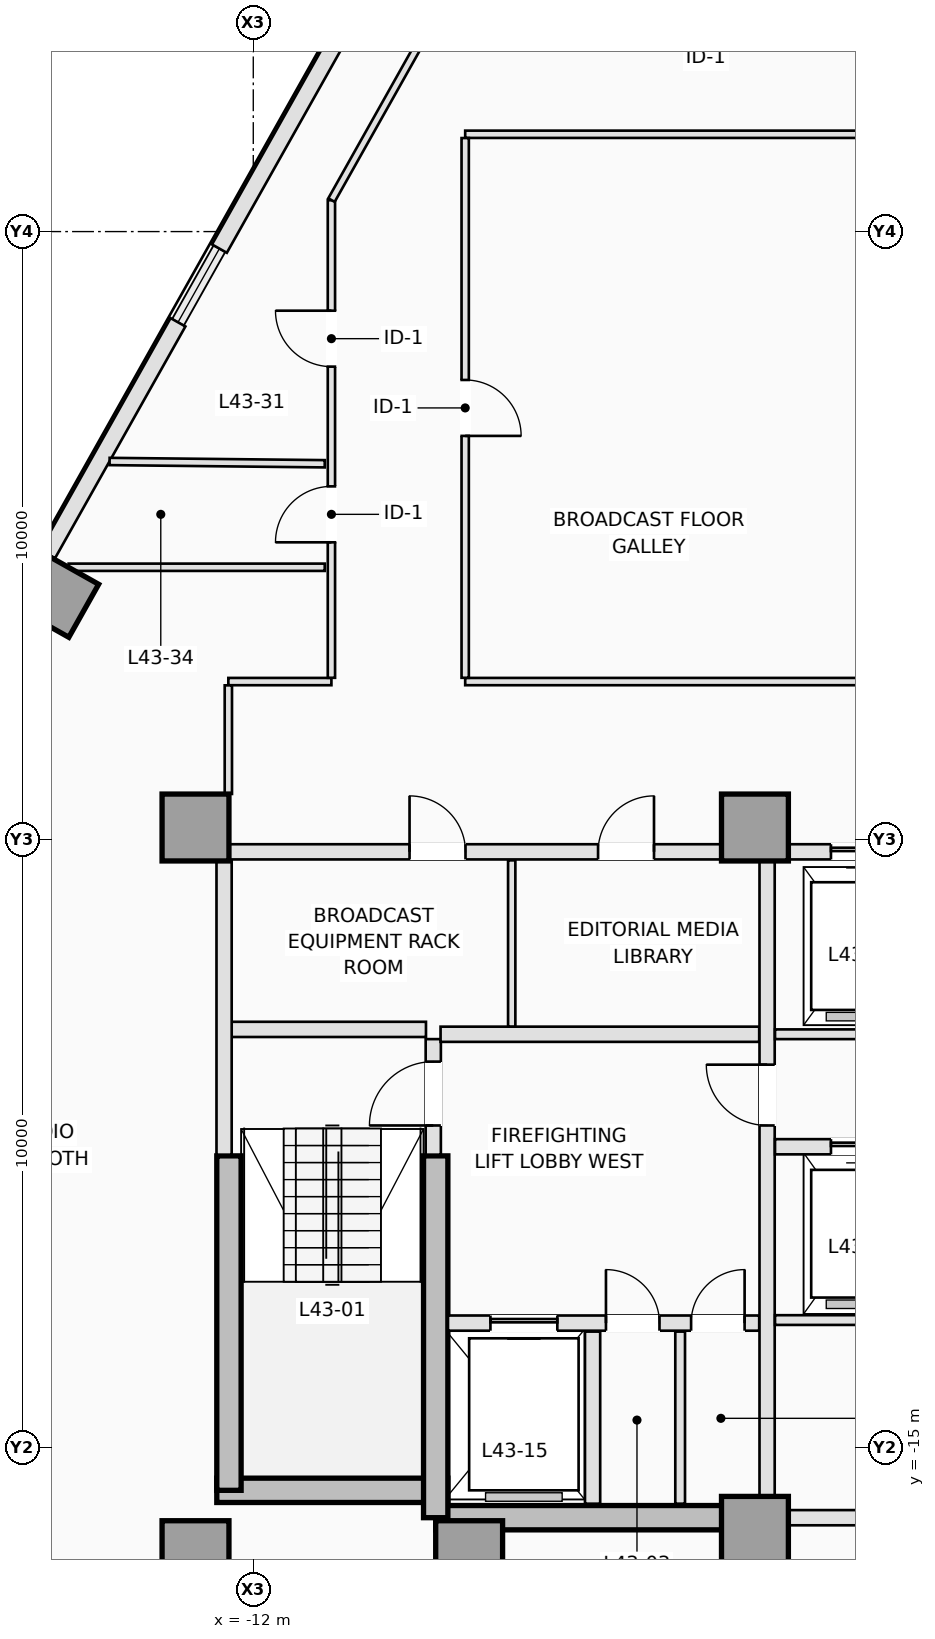
"""IFC4 building model, lengths in metres.
Left out: names, types, materials, properties, quantities, classifications, styles, units other than length and angle.
Written with IfcOpenShell. Run it as: python <this file> out.ifc"""

import sys

from ifc_helpers import new_model, si_unit, direction, frame, frame_2d, origin, origin_2d, place, context, subcontext, project, spatial, rectangle, extrude, element, fill, save


model = new_model("IFC4")
c1 = context("Model", 3, precision=1e-05, world=origin(), true_north=direction((0.0, 1.0)))
c2 = subcontext(c1, "Body", "Model", "MODEL_VIEW")
j1 = project(units=[si_unit("LENGTHUNIT", "METRE"), si_unit("PLANEANGLEUNIT", "RADIAN")], contexts=[c1])
p1 = place(None, origin())
s1 = spatial("IfcSite", under=j1, at=p1, CompositionType="ELEMENT")
p2 = place(p1, origin())
s2 = spatial("IfcBuilding", under=s1, at=p2, CompositionType="ELEMENT")
p3 = place(p2, frame((0.0, 0.0, 158.0)))
s3 = spatial("IfcBuildingStorey", under=s2, at=p3, CompositionType="ELEMENT", Elevation=158.0)
p4 = place(p3, frame((-12.6, -15.7, 0.0), z_axis=(0.0, 0.0, 1.0), x_axis=(1.0, 0.0, 0.0)))
e1 = element("IfcWall", 1, at=p4, inside=s3, PredefinedType="SHEAR", context=c2, shape_type="SweptSolid", body=[
    extrude(rectangle(XDim=3.8, YDim=0.4, at=frame_2d((1.9, 0.0))), origin(), (0.0, 0.0, 1.0), 3.5),
])
p5 = place(p3, frame((-9.0, -16.15, 0.0), z_axis=(0.0, 0.0, 1.0), x_axis=(1.0, 0.0, 0.0)))
e2 = element("IfcWall", 2, at=p5, inside=s3, PredefinedType="SHEAR", context=c2, shape_type="SweptSolid", body=[
    extrude(rectangle(XDim=5.25, YDim=0.4, at=frame_2d((2.625, 0.0))), origin(), (0.0, 0.0, 1.0), 3.5),
])
p6 = place(p3, frame((-12.4, -15.7, 0.0), z_axis=(0.0, 0.0, 1.0), x_axis=(0.0, 1.0, 0.0)))
e3 = element("IfcWall", 3, at=p6, inside=s3, PredefinedType="SHEAR", context=c2, shape_type="SweptSolid", body=[
    extrude(rectangle(XDim=5.5, YDim=0.4, at=frame_2d((2.75, 0.0))), origin(), (0.0, 0.0, 1.0), 3.5),
])
p7 = place(p3, frame((-9.0, -16.15, 0.0), z_axis=(0.0, 0.0, 1.0), x_axis=(0.0, 1.0, 0.0)))
e4 = element("IfcWall", 4, at=p7, inside=s3, PredefinedType="SHEAR", context=c2, shape_type="SweptSolid", body=[
    extrude(rectangle(XDim=5.95, YDim=0.4, at=frame_2d((2.975, 0.0))), origin(), (0.0, 0.0, 1.0), 3.5),
])
for number, where, z_axis, x_axis in (
    (5, (-12.95, -16.75, 0.0), (0.0, 0.0, 1.0), (1.0, 0.0, 0.0)),
    (6, (-8.45, -16.75, 0.0), (0.0, 0.0, 1.0), (1.0, 0.0, 0.0)),
    (7, (-3.75, -16.35, 0.0), (0.0, 0.0, 1.0), (1.0, 0.0, 0.0)),
    (8, (-12.95, -4.8, 0.0), (0.0, 0.0, 1.0), (1.0, 0.0, 0.0)),
    (9, (-3.75, -4.8, 0.0), (0.0, 0.0, 1.0), (1.0, 0.0, 0.0)),
):
    element("IfcColumn", number, at=place(p3, frame(where, z_axis=z_axis, x_axis=x_axis)), inside=s3, PredefinedType="COLUMN", context=c2, shape_type="SweptSolid", body=[
        extrude(rectangle(XDim=1.1, YDim=1.1, at=origin_2d()), origin(), (0.0, 0.0, 1.0), 3.5),
    ])
p8 = place(p3, frame((-15.224, -0.991, 0.0), z_axis=(0.0, 0.0, 1.0), x_axis=(-0.871575139605, 0.490261946333, 0.0)))
e10 = element("IfcColumn", 10, at=p8, inside=s3, PredefinedType="COLUMN", context=c2, shape_type="SweptSolid", body=[
    extrude(rectangle(XDim=1.0, YDim=1.0, at=origin_2d()), origin(), (0.0, 0.0, 1.0), 3.5),
])
p9 = place(p3, frame((-15.383, -0.305, 0.0), z_axis=(0.0, 0.0, 1.0), x_axis=(0.490232095789, 0.871591929895, 0.0)))
e11 = element("IfcWall", 11, at=p9, inside=s3, PredefinedType="STANDARD", context=c2, shape_type="SweptSolid", body=[
    extrude(rectangle(XDim=4.375, YDim=0.28, at=frame_2d((2.188, 0.0))), origin(), (0.0, 0.0, 1.0), 3.25),
])
p10 = place(p3, frame((-12.557, 4.72, 0.0), z_axis=(0.0, 0.0, 1.0), x_axis=(0.490274486291, 0.871568085747, 0.0)))
e12 = element("IfcWall", 12, at=p10, inside=s3, PredefinedType="STANDARD", context=c2, shape_type="SweptSolid", body=[
    extrude(rectangle(XDim=4.375, YDim=0.28, at=frame_2d((2.188, 0.0))), origin(), (0.0, 0.0, 1.0), 3.25),
])
p11 = place(p3, frame((-9.04, -10.18, 0.0), z_axis=(0.0, 0.0, 1.0), x_axis=(0.0, 1.0, 0.0)))
e13 = element("IfcWall", 13, at=p11, inside=s3, PredefinedType="PARTITIONING", context=c2, shape_type="SweptSolid", body=[
    extrude(rectangle(XDim=1.9, YDim=0.25, at=frame_2d((0.95, 0.0))), origin(), (0.0, 0.0, 1.0), 3.25),
])
p12 = place(p11, frame((0.48, 0.0, 0.0)))
e14 = element("IfcOpeningElement", 14, at=p12, cuts=e13, PredefinedType="OPENING", context=c2, shape_type="SweptSolid", body=[
    extrude(rectangle(XDim=1.05, YDim=2.15, at=frame_2d((0.525, 1.075))), frame((0.0, 0.135, 0.0), z_axis=(0.0, -1.0, 0.0), x_axis=(1.0, 0.0, 0.0)), (0.0, 0.0, 1.0), 0.27),
])
p13 = place(p3, frame((-12.38, -8.12, 0.0), z_axis=(0.0, 0.0, 1.0), x_axis=(1.0, 0.0, 0.0)))
e15 = element("IfcWall", 15, at=p13, inside=s3, PredefinedType="PARTITIONING", context=c2, shape_type="SweptSolid", body=[
    extrude(rectangle(XDim=3.22, YDim=0.25, at=frame_2d((1.61, 0.0))), origin(), (0.0, 0.0, 1.0), 3.25),
])
p14 = place(p3, frame((-12.48, -10.18, 0.0), z_axis=(0.0, 0.0, 1.0), x_axis=(0.0, 1.0, 0.0)))
e16 = element("IfcWall", 16, at=p14, inside=s3, PredefinedType="PARTITIONING", context=c2, shape_type="SweptSolid", body=[
    extrude(rectangle(XDim=4.828, YDim=0.25, at=frame_2d((2.414, 0.0))), origin(), (0.0, 0.0, 1.0), 3.25),
])
p15 = place(p3, frame((-8.798, -12.95, 0.0), z_axis=(0.0, 0.0, 1.0), x_axis=(1.0, 0.0, 0.0)))
e17 = element("IfcWall", 17, at=p15, inside=s3, PredefinedType="PARTITIONING", context=c2, shape_type="SweptSolid", body=[
    extrude(rectangle(XDim=5.118, YDim=0.25, at=frame_2d((2.559, 0.0))), origin(), (0.0, 0.0, 1.0), 3.25),
])
p16 = place(p15, frame((0.698, 0.0, 0.0)))
e18 = element("IfcOpeningElement", 18, at=p16, cuts=e17, PredefinedType="OPENING", context=c2, shape_type="SweptSolid", body=[
    extrude(rectangle(XDim=1.1, YDim=2.15, at=frame_2d((0.55, 1.075))), frame((0.0, 0.135, 0.0), z_axis=(0.0, -1.0, 0.0), x_axis=(1.0, 0.0, 0.0)), (0.0, 0.0, 1.0), 0.27),
])
p17 = place(p15, frame((2.598, 0.0, 0.0)))
e19 = element("IfcOpeningElement", 19, at=p17, cuts=e17, PredefinedType="OPENING", context=c2, shape_type="SweptSolid", body=[
    extrude(rectangle(XDim=0.88, YDim=2.1, at=frame_2d((0.44, 1.05))), frame((0.0, 0.135, 0.0), z_axis=(0.0, -1.0, 0.0), x_axis=(1.0, 0.0, 0.0)), (0.0, 0.0, 1.0), 0.27),
])
p18 = place(p15, frame((3.998, 0.0, 0.0)))
e20 = element("IfcOpeningElement", 20, at=p18, cuts=e17, PredefinedType="OPENING", context=c2, shape_type="SweptSolid", body=[
    extrude(rectangle(XDim=0.88, YDim=2.1, at=frame_2d((0.44, 1.05))), frame((0.0, 0.135, 0.0), z_axis=(0.0, -1.0, 0.0), x_axis=(1.0, 0.0, 0.0)), (0.0, 0.0, 1.0), 0.27),
])
p19 = place(p3, frame((-6.42, -15.92, 0.0), z_axis=(0.0, 0.0, 1.0), x_axis=(0.0, 1.0, 0.0)))
e21 = element("IfcWall", 21, at=p19, inside=s3, PredefinedType="PARTITIONING", context=c2, shape_type="SweptSolid", body=[
    extrude(rectangle(XDim=2.83, YDim=0.25, at=frame_2d((1.415, 0.0))), origin(), (0.0, 0.0, 1.0), 3.25),
])
p20 = place(p3, frame((-4.98, -15.92, 0.0), z_axis=(0.0, 0.0, 1.0), x_axis=(0.0, 1.0, 0.0)))
e22 = element("IfcWall", 22, at=p20, inside=s3, PredefinedType="PARTITIONING", context=c2, shape_type="SweptSolid", body=[
    extrude(rectangle(XDim=2.83, YDim=0.16, at=frame_2d((1.415, 0.0))), origin(), (0.0, 0.0, 1.0), 3.25),
])
p21 = place(p3, frame((-8.92, -8.2, 0.0), z_axis=(0.0, 0.0, 1.0), x_axis=(1.0, 0.0, 0.0)))
e23 = element("IfcWall", 23, at=p21, inside=s3, PredefinedType="PARTITIONING", context=c2, shape_type="SweptSolid", body=[
    extrude(rectangle(XDim=5.24, YDim=0.25, at=frame_2d((2.62, 0.0))), origin(), (0.0, 0.0, 1.0), 3.25),
])
p22 = place(p3, frame((-3.55, -15.798, 0.0), z_axis=(0.0, 0.0, 1.0), x_axis=(0.0, 1.0, 0.0)))
e24 = element("IfcWall", 24, at=p22, inside=s3, PredefinedType="PARTITIONING", context=c2, shape_type="SweptSolid", body=[
    extrude(rectangle(XDim=10.446, YDim=0.25, at=frame_2d((5.223, 0.0))), origin(), (0.0, 0.0, 1.0), 3.25),
])
p23 = place(p22, frame((6.098, 0.0, 0.0)))
e25 = element("IfcOpeningElement", 25, at=p23, cuts=e24, PredefinedType="OPENING", context=c2, shape_type="SweptSolid", body=[
    extrude(rectangle(XDim=1.0, YDim=2.15, at=frame_2d((0.5, 1.075))), frame((0.0, 0.135, 0.0), z_axis=(0.0, -1.0, 0.0), x_axis=(1.0, 0.0, 0.0)), (0.0, 0.0, 1.0), 0.27),
])
p24 = place(p3, frame((-12.398, -5.2, 0.0), z_axis=(0.0, 0.0, 1.0), x_axis=(1.0, 0.0, 0.0)))
e26 = element("IfcWall", 26, at=p24, inside=s3, PredefinedType="PARTITIONING", context=c2, shape_type="SweptSolid", body=[
    extrude(rectangle(XDim=8.096, YDim=0.25, at=frame_2d((4.048, 0.0))), origin(), (0.0, 0.0, 1.0), 3.25),
])
p25 = place(p24, frame((2.968, 0.0, 0.0)))
e27 = element("IfcOpeningElement", 27, at=p25, cuts=e26, PredefinedType="OPENING", context=c2, shape_type="SweptSolid", body=[
    extrude(rectangle(XDim=0.92, YDim=2.12, at=frame_2d((0.46, 1.06))), frame((0.0, 0.135, 0.0), z_axis=(0.0, -1.0, 0.0), x_axis=(1.0, 0.0, 0.0)), (0.0, 0.0, 1.0), 0.27),
])
p26 = place(p24, frame((6.068, 0.0, 0.0)))
e28 = element("IfcOpeningElement", 28, at=p26, cuts=e26, PredefinedType="OPENING", context=c2, shape_type="SweptSolid", body=[
    extrude(rectangle(XDim=0.92, YDim=2.12, at=frame_2d((0.46, 1.06))), frame((0.0, 0.135, 0.0), z_axis=(0.0, -1.0, 0.0), x_axis=(1.0, 0.0, 0.0)), (0.0, 0.0, 1.0), 0.27),
])
p27 = place(p3, frame((-3.198, -5.2, 0.0), z_axis=(0.0, 0.0, 1.0), x_axis=(1.0, 0.0, 0.0)))
e29 = element("IfcWall", 29, at=p27, inside=s3, PredefinedType="PARTITIONING", context=c2, shape_type="SweptSolid", body=[
    extrude(rectangle(XDim=2.248, YDim=0.25, at=frame_2d((1.124, 0.0))), origin(), (0.0, 0.0, 1.0), 3.25),
])
p28 = place(p27, frame((0.698, 0.0, 0.0)))
e30 = element("IfcOpeningElement", 30, at=p28, cuts=e29, PredefinedType="OPENING", context=c2, shape_type="SweptSolid", body=[
    extrude(rectangle(XDim=1.0, YDim=2.15, at=frame_2d((0.5, 1.075))), frame((0.0, 0.135, 0.0), z_axis=(0.0, -1.0, 0.0), x_axis=(1.0, 0.0, 0.0)), (0.0, 0.0, 1.0), 0.27),
])
p29 = place(p3, frame((-7.75, -8.073, 0.0), z_axis=(0.0, 0.0, 1.0), x_axis=(0.0, 1.0, 0.0)))
e31 = element("IfcWall", 31, at=p29, inside=s3, PredefinedType="PARTITIONING", context=c2, shape_type="SweptSolid", body=[
    extrude(rectangle(XDim=2.733, YDim=0.12, at=frame_2d((1.366, 0.0))), origin(), (0.0, 0.0, 1.0), 3.25),
])
p30 = place(p3, frame((-3.198, -16.15, 0.0), z_axis=(0.0, 0.0, 1.0), x_axis=(1.0, 0.0, 0.0)))
e32 = element("IfcWall", 32, at=p30, inside=s3, PredefinedType="PARTITIONING", context=c2, shape_type="SweptSolid", body=[
    extrude(rectangle(XDim=6.396, YDim=0.25, at=frame_2d((3.198, 0.0))), origin(), (0.0, 0.0, 1.0), 2.45),
])
p31 = place(p3, frame((-3.42, -8.2, 0.0), z_axis=(0.0, 0.0, 1.0), x_axis=(1.0, 0.0, 0.0)))
e33 = element("IfcWall", 33, at=p31, inside=s3, PredefinedType="PARTITIONING", context=c2, shape_type="SweptSolid", body=[
    extrude(rectangle(XDim=2.47, YDim=0.16, at=frame_2d((1.235, 0.0))), origin(), (0.0, 0.0, 1.0), 3.25),
])
p32 = place(p3, frame((-3.42, -10.05, 0.0), z_axis=(0.0, 0.0, 1.0), x_axis=(1.0, 0.0, 0.0)))
e34 = element("IfcWall", 34, at=p32, inside=s3, PredefinedType="PARTITIONING", context=c2, shape_type="SweptSolid", body=[
    extrude(rectangle(XDim=2.47, YDim=0.25, at=frame_2d((1.235, 0.0))), origin(), (0.0, 0.0, 1.0), 3.25),
])
p33 = place(p32, frame((0.92, 0.0, 0.0)))
e35 = element("IfcOpeningElement", 35, at=p33, cuts=e34, PredefinedType="OPENING", context=c2, shape_type="SweptSolid", body=[
    extrude(rectangle(XDim=1.0, YDim=2.15, at=frame_2d((0.5, 1.075))), frame((0.0, 0.135, 0.0), z_axis=(0.0, -1.0, 0.0), x_axis=(1.0, 0.0, 0.0)), (0.0, 0.0, 1.0), 0.27),
])
p34 = place(p3, frame((-3.42, -12.9, 0.0), z_axis=(0.0, 0.0, 1.0), x_axis=(1.0, 0.0, 0.0)))
e36 = element("IfcWall", 36, at=p34, inside=s3, PredefinedType="PARTITIONING", context=c2, shape_type="SweptSolid", body=[
    extrude(rectangle(XDim=6.84, YDim=0.16, at=frame_2d((3.42, 0.0))), origin(), (0.0, 0.0, 1.0), 3.25),
])
p35 = place(p34, frame((2.98, 0.0, 0.0)))
e37 = element("IfcOpeningElement", 37, at=p35, cuts=e36, PredefinedType="OPENING", context=c2, shape_type="SweptSolid", body=[
    extrude(rectangle(XDim=0.88, YDim=2.12, at=frame_2d((0.44, 1.06))), frame((0.0, 0.09, 0.0), z_axis=(0.0, -1.0, 0.0), x_axis=(1.0, 0.0, 0.0)), (0.0, 0.0, 1.0), 0.18),
])
p36 = place(p3, frame((-12.41, -2.4, 0.0), z_axis=(0.0, 0.0, 1.0), x_axis=(1.0, 0.0, 0.0)))
e38 = element("IfcWall", 38, at=p36, inside=s3, PredefinedType="PARTITIONING", context=c2, shape_type="SweptSolid", body=[
    extrude(rectangle(XDim=1.695, YDim=0.12, at=frame_2d((0.847, 0.0))), origin(), (0.0, 0.0, 1.0), 3.25),
])
p37 = place(p3, frame((-10.715, -2.338, 0.0), z_axis=(0.0, 0.0, 1.0), x_axis=(0.0, 1.0, 0.0)))
e39 = element("IfcWall", 39, at=p37, inside=s3, PredefinedType="PARTITIONING", context=c2, shape_type="SweptSolid", body=[
    extrude(rectangle(XDim=7.854, YDim=0.12, at=frame_2d((3.927, 0.0))), origin(), (0.0, 0.0, 1.0), 3.25),
])
p38 = place(p37, frame((5.117, 0.0, 0.0)))
e40 = element("IfcOpeningElement", 40, at=p38, cuts=e39, PredefinedType="OPENING", context=c2, shape_type="SweptSolid", body=[
    extrude(rectangle(XDim=0.92, YDim=2.12, at=frame_2d((0.46, 1.06))), frame((0.0, 0.07, 0.0), z_axis=(0.0, -1.0, 0.0), x_axis=(1.0, 0.0, 0.0)), (0.0, 0.0, 1.0), 0.14),
])
p39 = place(p37, frame((2.228, 0.0, 0.0)))
e41 = element("IfcOpeningElement", 41, at=p39, cuts=e39, PredefinedType="OPENING", context=c2, shape_type="SweptSolid", body=[
    extrude(rectangle(XDim=0.92, YDim=2.12, at=frame_2d((0.46, 1.06))), frame((0.0, 0.07, 0.0), z_axis=(0.0, -1.0, 0.0), x_axis=(1.0, 0.0, 0.0)), (0.0, 0.0, 1.0), 0.14),
])
p40 = place(p3, frame((-10.714, 5.518, 0.0), z_axis=(0.0, 0.0, 1.0), x_axis=(0.490248927543, 0.871582462561, 0.0)))
e42 = element("IfcWall", 42, at=p40, inside=s3, PredefinedType="PARTITIONING", context=c2, shape_type="SweptSolid", body=[
    extrude(rectangle(XDim=3.766, YDim=0.12, at=frame_2d((1.883, 0.0))), origin(), (0.0, 0.0, 1.0), 3.25),
])
p41 = place(p3, frame((-12.41, -4.248, 0.0), z_axis=(0.0, 0.0, 1.0), x_axis=(0.0, 1.0, 0.0)))
e43 = element("IfcWall", 43, at=p41, inside=s3, PredefinedType="PARTITIONING", context=c2, shape_type="SweptSolid", body=[
    extrude(rectangle(XDim=1.786, YDim=0.12, at=frame_2d((0.893, 0.0))), origin(), (0.0, 0.0, 1.0), 3.25),
])
p42 = place(p3, frame((-8.515, -2.4, 0.0), z_axis=(0.0, 0.0, 1.0), x_axis=(1.0, 0.0, 0.0)))
e44 = element("IfcWall", 44, at=p42, inside=s3, PredefinedType="PARTITIONING", context=c2, shape_type="SweptSolid", body=[
    extrude(rectangle(XDim=9.753, YDim=0.12, at=frame_2d((4.876, 0.0))), origin(), (0.0, 0.0, 1.0), 2.891),
])
p43 = place(p3, frame((8.723, 6.6, 0.0), z_axis=(0.0, 0.0, 1.0), x_axis=(-1.0, 0.0, 0.0)))
e45 = element("IfcWall", 45, at=p43, inside=s3, PredefinedType="PARTITIONING", context=c2, shape_type="SweptSolid", body=[
    extrude(rectangle(XDim=17.238, YDim=0.12, at=frame_2d((8.619, 0.0))), origin(), (0.0, 0.0, 1.0), 2.891),
])
p44 = place(p3, frame((-8.515, 6.538, 0.0), z_axis=(0.0, 0.0, 1.0), x_axis=(0.0, -1.0, 0.0)))
e46 = element("IfcWall", 46, at=p44, inside=s3, PredefinedType="PARTITIONING", context=c2, shape_type="SweptSolid", body=[
    extrude(rectangle(XDim=8.876, YDim=0.12, at=frame_2d((4.438, 0.0))), origin(), (0.0, 0.0, 1.0), 3.25),
])
p45 = place(p44, frame((3.978, 0.0, 0.0)))
e47 = element("IfcOpeningElement", 47, at=p45, cuts=e46, PredefinedType="OPENING", context=c2, shape_type="SweptSolid", body=[
    extrude(rectangle(XDim=0.92, YDim=2.12, at=frame_2d((0.46, 1.06))), frame((0.0, 0.07, 0.0), z_axis=(0.0, -1.0, 0.0), x_axis=(1.0, 0.0, 0.0)), (0.0, 0.0, 1.0), 0.14),
])
p46 = place(p3, frame((-10.825, 1.182, 0.0), z_axis=(0.0, 0.0, 1.0), x_axis=(-0.999943542972, 0.010625952637, 0.0)))
e48 = element("IfcWall", 48, at=p46, inside=s3, PredefinedType="PARTITIONING", context=c2, shape_type="SweptSolid", body=[
    extrude(rectangle(XDim=3.538, YDim=0.12, at=frame_2d((1.769, 0.0))), origin(), (0.0, 0.0, 1.0), 3.25),
])
p47 = place(p3, frame((-10.825, -0.52, 0.0), z_axis=(0.0, 0.0, 1.0), x_axis=(-1.0, 0.0, 0.0)))
e49 = element("IfcWall", 49, at=p47, inside=s3, PredefinedType="PARTITIONING", context=c2, shape_type="SweptSolid", body=[
    extrude(rectangle(XDim=4.211, YDim=0.12, at=frame_2d((2.106, 0.0))), origin(), (0.0, 0.0, 1.0), 3.25),
])
p48 = place(p28, origin())
e50 = element("IfcDoor", 50, at=p48, inside=s3, OperationType="SLIDING_TO_LEFT", PredefinedType="DOOR", context=c2, shape_type="SweptSolid", body=[
    extrude(rectangle(XDim=1.0, YDim=2.15, at=frame_2d((0.5, 1.075))), frame((0.0, 0.025, 0.0), z_axis=(0.0, -1.0, 0.0), x_axis=(1.0, 0.0, 0.0)), (0.0, 0.0, 1.0), 0.05),
])
fill(e30, e50)
p49 = place(p16, origin())
e51 = element("IfcDoor", 51, at=p49, inside=s3, OperationType="SLIDING_TO_LEFT", PredefinedType="DOOR", context=c2, shape_type="SweptSolid", body=[
    extrude(rectangle(XDim=1.1, YDim=2.15, at=frame_2d((0.55, 1.075))), frame((0.0, 0.025, 0.0), z_axis=(0.0, -1.0, 0.0), x_axis=(1.0, 0.0, 0.0)), (0.0, 0.0, 1.0), 0.05),
])
fill(e18, e51)
p50 = place(p33, origin())
e52 = element("IfcDoor", 52, at=p50, inside=s3, OperationType="SLIDING_TO_LEFT", PredefinedType="DOOR", context=c2, shape_type="SweptSolid", body=[
    extrude(rectangle(XDim=1.0, YDim=2.15, at=frame_2d((0.5, 1.075))), frame((0.0, 0.025, 0.0), z_axis=(0.0, -1.0, 0.0), x_axis=(1.0, 0.0, 0.0)), (0.0, 0.0, 1.0), 0.05),
])
fill(e35, e52)
p51 = place(p12, origin())
e53 = element("IfcDoor", 53, at=p51, inside=s3, OperationType="SINGLE_SWING_LEFT", PredefinedType="DOOR", context=c2, shape_type="SweptSolid", body=[
    extrude(rectangle(XDim=1.05, YDim=2.15, at=frame_2d((0.525, 1.075))), frame((0.0, 0.025, 0.0), z_axis=(0.0, -1.0, 0.0), x_axis=(1.0, 0.0, 0.0)), (0.0, 0.0, 1.0), 0.05),
])
fill(e14, e53)
p52 = place(p17, origin())
e54 = element("IfcDoor", 54, at=p52, inside=s3, OperationType="SINGLE_SWING_LEFT", PredefinedType="TRAPDOOR", context=c2, shape_type="SweptSolid", body=[
    extrude(rectangle(XDim=0.88, YDim=2.1, at=frame_2d((0.44, 1.05))), frame((0.0, 0.025, 0.0), z_axis=(0.0, -1.0, 0.0), x_axis=(1.0, 0.0, 0.0)), (0.0, 0.0, 1.0), 0.05),
])
fill(e19, e54)
p53 = place(p18, origin())
e55 = element("IfcDoor", 55, at=p53, inside=s3, OperationType="SINGLE_SWING_RIGHT", PredefinedType="TRAPDOOR", context=c2, shape_type="SweptSolid", body=[
    extrude(rectangle(XDim=0.88, YDim=2.1, at=frame_2d((0.44, 1.05))), frame((0.0, 0.025, 0.0), z_axis=(0.0, -1.0, 0.0), x_axis=(1.0, 0.0, 0.0)), (0.0, 0.0, 1.0), 0.05),
])
fill(e20, e55)
p54 = place(p23, origin())
e56 = element("IfcDoor", 56, at=p54, inside=s3, OperationType="SINGLE_SWING_RIGHT", PredefinedType="DOOR", context=c2, shape_type="SweptSolid", body=[
    extrude(rectangle(XDim=1.0, YDim=2.15, at=frame_2d((0.5, 1.075))), frame((0.0, 0.025, 0.0), z_axis=(0.0, -1.0, 0.0), x_axis=(1.0, 0.0, 0.0)), (0.0, 0.0, 1.0), 0.05),
])
fill(e25, e56)
p55 = place(p25, origin())
e57 = element("IfcDoor", 57, at=p55, inside=s3, OperationType="SINGLE_SWING_LEFT", PredefinedType="DOOR", context=c2, shape_type="SweptSolid", body=[
    extrude(rectangle(XDim=0.92, YDim=2.12, at=frame_2d((0.46, 1.06))), frame((0.0, 0.025, 0.0), z_axis=(0.0, -1.0, 0.0), x_axis=(1.0, 0.0, 0.0)), (0.0, 0.0, 1.0), 0.05),
])
fill(e27, e57)
p56 = place(p26, origin())
e58 = element("IfcDoor", 58, at=p56, inside=s3, OperationType="SINGLE_SWING_RIGHT", PredefinedType="DOOR", context=c2, shape_type="SweptSolid", body=[
    extrude(rectangle(XDim=0.92, YDim=2.12, at=frame_2d((0.46, 1.06))), frame((0.0, 0.025, 0.0), z_axis=(0.0, -1.0, 0.0), x_axis=(1.0, 0.0, 0.0)), (0.0, 0.0, 1.0), 0.05),
])
fill(e28, e58)
p57 = place(p38, origin())
e59 = element("IfcDoor", 59, at=p57, inside=s3, OperationType="SINGLE_SWING_RIGHT", PredefinedType="DOOR", context=c2, shape_type="SweptSolid", body=[
    extrude(rectangle(XDim=0.92, YDim=2.12, at=frame_2d((0.46, 1.06))), frame((0.0, 0.025, 0.0), z_axis=(0.0, -1.0, 0.0), x_axis=(1.0, 0.0, 0.0)), (0.0, 0.0, 1.0), 0.05),
])
fill(e40, e59)
p58 = place(p45, origin())
e60 = element("IfcDoor", 60, at=p58, inside=s3, OperationType="SINGLE_SWING_RIGHT", PredefinedType="DOOR", context=c2, shape_type="SweptSolid", body=[
    extrude(rectangle(XDim=0.92, YDim=2.12, at=frame_2d((0.46, 1.06))), frame((0.0, 0.025, 0.0), z_axis=(0.0, -1.0, 0.0), x_axis=(1.0, 0.0, 0.0)), (0.0, 0.0, 1.0), 0.05),
])
fill(e47, e60)
p59 = place(p39, origin())
e61 = element("IfcDoor", 61, at=p59, inside=s3, OperationType="SINGLE_SWING_LEFT", PredefinedType="DOOR", context=c2, shape_type="SweptSolid", body=[
    extrude(rectangle(XDim=0.92, YDim=2.12, at=frame_2d((0.46, 1.06))), frame((0.0, 0.025, 0.0), z_axis=(0.0, -1.0, 0.0), x_axis=(1.0, 0.0, 0.0)), (0.0, 0.0, 1.0), 0.05),
])
fill(e41, e61)
save(model, sys.argv[1])
